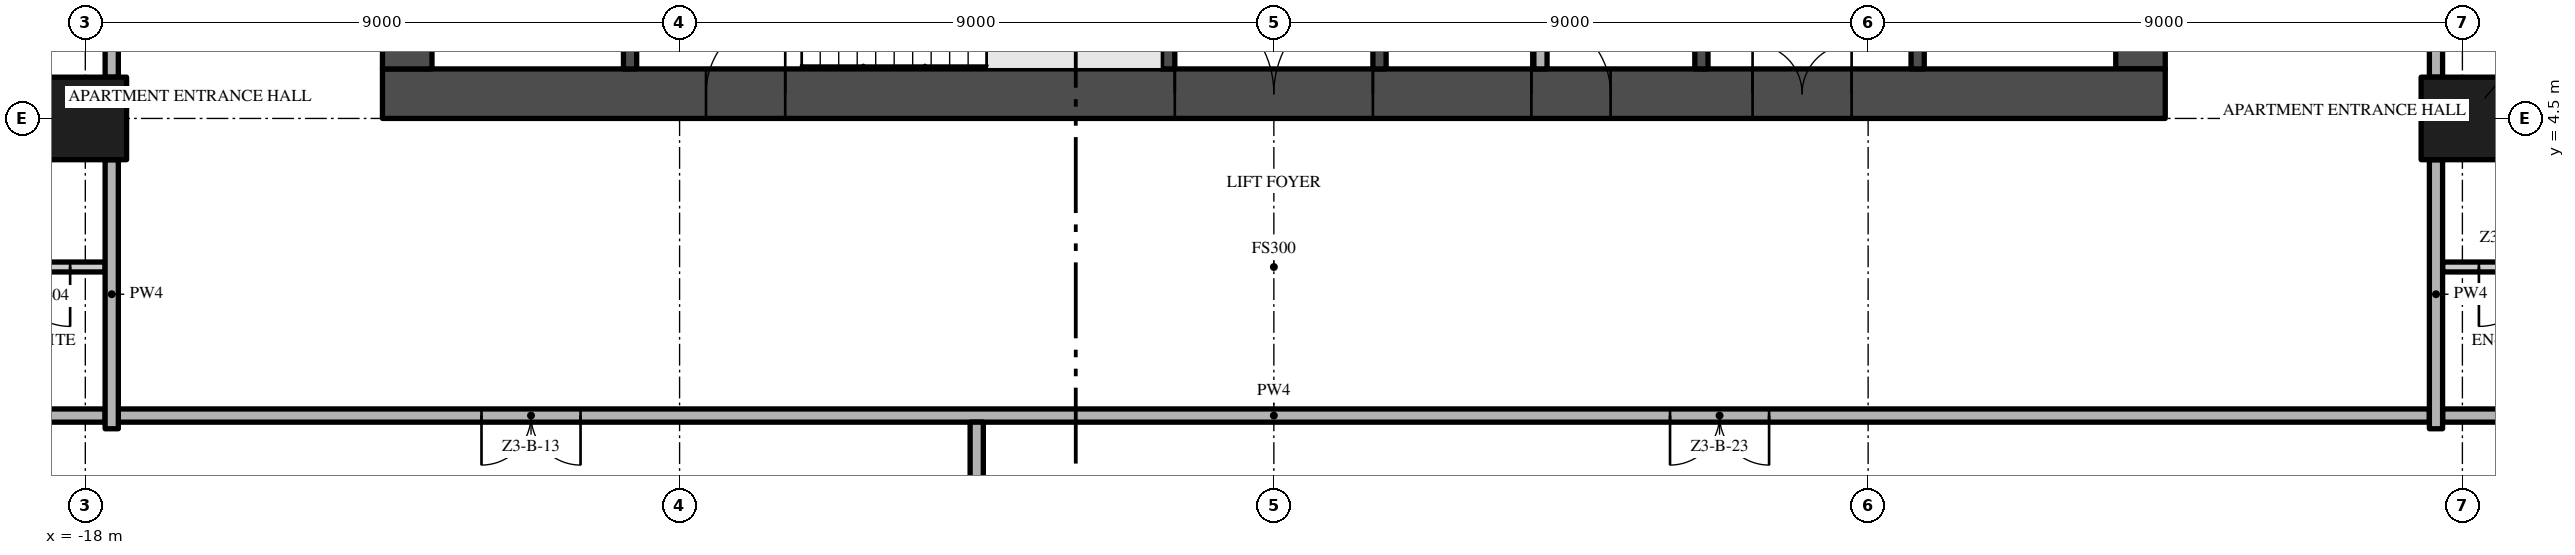
"""IFC4 building model, lengths in metres.
Left out: names, types, materials, properties, quantities, classifications, styles, units other than length and angle.
Written with IfcOpenShell. Run it as: python <this file> out.ifc"""

import sys

from ifc_helpers import new_model, si_unit, direction, frame, frame_2d, origin, origin_2d, place, context, subcontext, project, spatial, rectangle, extrude, element, fill, save


model = new_model("IFC4")
c1 = context("Model", 3, precision=1e-05, world=origin(), true_north=direction((0.0, 1.0)))
c2 = subcontext(c1, "Body", "Model", "MODEL_VIEW")
j1 = project(units=[si_unit("LENGTHUNIT", "METRE"), si_unit("PLANEANGLEUNIT", "RADIAN")], contexts=[c1])
p1 = place(None, origin())
s1 = spatial("IfcSite", under=j1, at=p1, CompositionType="ELEMENT")
p2 = place(p1, origin())
s2 = spatial("IfcBuilding", under=s1, at=p2, CompositionType="ELEMENT")
p3 = place(p2, frame((0.0, 0.0, 140.2)))
s3 = spatial("IfcBuildingStorey", under=s2, at=p3, CompositionType="ELEMENT", Elevation=140.2)
p4 = place(p3, frame((-13.5, 4.875, -0.3), z_axis=(0.0, 0.0, 1.0), x_axis=(1.0, 0.0, 0.0)))
e1 = element("IfcWall", 1, at=p4, inside=s3, PredefinedType="SHEAR", context=c2, shape_type="SweptSolid", body=[
    extrude(rectangle(XDim=27.0, YDim=0.75, at=frame_2d((13.5, 0.0))), origin(), (0.0, 0.0, 1.0), 3.8),
])
p5 = place(p4, frame((12.0, 0.0, 0.3)))
e2 = element("IfcOpeningElement", 2, at=p5, cuts=e1, PredefinedType="OPENING", context=c2, shape_type="SweptSolid", body=[
    extrude(rectangle(XDim=3.0, YDim=2.4, at=frame_2d((1.5, 1.2))), frame((0.0, 0.385, 0.0), z_axis=(0.0, -1.0, 0.0), x_axis=(1.0, 0.0, 0.0)), (0.0, 0.0, 1.0), 0.77),
])
p6 = place(p4, frame((4.9, 0.0, 0.3)))
e3 = element("IfcOpeningElement", 3, at=p6, cuts=e1, PredefinedType="OPENING", context=c2, shape_type="SweptSolid", body=[
    extrude(rectangle(XDim=1.2, YDim=2.2, at=frame_2d((0.6, 1.1))), frame((0.0, 0.385, 0.0), z_axis=(0.0, -1.0, 0.0), x_axis=(1.0, 0.0, 0.0)), (0.0, 0.0, 1.0), 0.77),
])
p7 = place(p4, frame((20.75, 0.0, 0.3)))
e4 = element("IfcOpeningElement", 4, at=p7, cuts=e1, PredefinedType="OPENING", context=c2, shape_type="SweptSolid", body=[
    extrude(rectangle(XDim=1.5, YDim=2.2, at=frame_2d((0.75, 1.1))), frame((0.0, 0.385, 0.0), z_axis=(0.0, -1.0, 0.0), x_axis=(1.0, 0.0, 0.0)), (0.0, 0.0, 1.0), 0.77),
])
p8 = place(p4, frame((17.4, 0.0, 0.3)))
e5 = element("IfcOpeningElement", 5, at=p8, cuts=e1, PredefinedType="OPENING", context=c2, shape_type="SweptSolid", body=[
    extrude(rectangle(XDim=1.2, YDim=2.2, at=frame_2d((0.6, 1.1))), frame((0.0, 0.385, 0.0), z_axis=(0.0, -1.0, 0.0), x_axis=(1.0, 0.0, 0.0)), (0.0, 0.0, 1.0), 0.77),
])
p9 = place(p3, frame((13.125, 5.25, -0.3), z_axis=(0.0, 0.0, 1.0), x_axis=(0.0, 1.0, 0.0)))
e6 = element("IfcWall", 6, at=p9, inside=s3, PredefinedType="SHEAR", context=c2, shape_type="SweptSolid", body=[
    extrude(rectangle(XDim=16.5, YDim=0.75, at=frame_2d((8.25, 0.0))), origin(), (0.0, 0.0, 1.0), 3.8),
])
p10 = place(p9, frame((6.15, 0.0, 0.3)))
e7 = element("IfcOpeningElement", 7, at=p10, cuts=e6, PredefinedType="OPENING", context=c2, shape_type="SweptSolid", body=[
    extrude(rectangle(XDim=1.2, YDim=2.2, at=frame_2d((0.6, 1.1))), frame((0.0, 0.385, 0.0), z_axis=(0.0, -1.0, 0.0), x_axis=(1.0, 0.0, 0.0)), (0.0, 0.0, 1.0), 0.77),
])
p11 = place(p3, frame((-13.125, 21.75, -0.3), z_axis=(0.0, 0.0, 1.0), x_axis=(0.0, -1.0, 0.0)))
e8 = element("IfcWall", 8, at=p11, inside=s3, PredefinedType="SHEAR", context=c2, shape_type="SweptSolid", body=[
    extrude(rectangle(XDim=16.5, YDim=0.75, at=frame_2d((8.25, 0.0))), origin(), (0.0, 0.0, 1.0), 3.8),
])
p12 = place(p11, frame((9.15, 0.0, 0.3)))
e9 = element("IfcOpeningElement", 9, at=p12, cuts=e8, PredefinedType="OPENING", context=c2, shape_type="SweptSolid", body=[
    extrude(rectangle(XDim=1.2, YDim=2.2, at=frame_2d((0.6, 1.1))), frame((0.0, 0.385, 0.0), z_axis=(0.0, -1.0, 0.0), x_axis=(1.0, 0.0, 0.0)), (0.0, 0.0, 1.0), 0.77),
])
for number, where, z_axis, x_axis in (
    (10, (-18.0, 4.5, 0.0), (0.0, 0.0, 1.0), (1.0, 0.0, 0.0)),
    (11, (18.0, 4.5, 0.0), (0.0, 0.0, 1.0), (1.0, 0.0, 0.0)),
):
    element("IfcColumn", number, at=place(p3, frame(where, z_axis=z_axis, x_axis=x_axis)), inside=s3, PredefinedType="COLUMN", context=c2, shape_type="SweptSolid", body=[
        extrude(rectangle(XDim=1.25, YDim=1.25, at=origin_2d()), origin(), (0.0, 0.0, 1.0), 3.5),
    ])
for number, where, z_axis, x_axis in (
    (12, (-9.75, 5.25, 0.0), (0.0, 0.0, 1.0), (0.0, 1.0, 0.0)),
    (13, (-1.6, 5.25, 0.0), (0.0, 0.0, 1.0), (0.0, 1.0, 0.0)),
):
    element("IfcWall", number, at=place(p3, frame(where, z_axis=z_axis, x_axis=x_axis)), inside=s3, PredefinedType="SHEAR", context=c2, shape_type="SweptSolid", body=[
        extrude(rectangle(XDim=2.7, YDim=0.2, at=frame_2d((1.35, 0.0))), origin(), (0.0, 0.0, 1.0), 3.5),
    ])
p13 = place(p3, frame((1.6, 9.8, 0.0), z_axis=(0.0, 0.0, 1.0), x_axis=(0.0, -1.0, 0.0)))
e14 = element("IfcWall", 14, at=p13, inside=s3, PredefinedType="SHEAR", context=c2, shape_type="SweptSolid", body=[
    extrude(rectangle(XDim=4.55, YDim=0.2, at=frame_2d((2.275, 0.0))), origin(), (0.0, 0.0, 1.0), 3.5),
])
p14 = place(p13, frame((1.425, 0.0, 0.0)))
e15 = element("IfcOpeningElement", 15, at=p14, cuts=e14, PredefinedType="OPENING", context=c2, shape_type="SweptSolid", body=[
    extrude(rectangle(XDim=0.9, YDim=2.1, at=frame_2d((0.45, 1.05))), frame((0.0, 0.11, 0.0), z_axis=(0.0, -1.0, 0.0), x_axis=(1.0, 0.0, 0.0)), (0.0, 0.0, 1.0), 0.22),
])
p15 = place(p3, frame((4.037, 9.8, 0.0), z_axis=(0.0, 0.0, 1.0), x_axis=(0.0, -1.0, 0.0)))
e16 = element("IfcWall", 16, at=p15, inside=s3, PredefinedType="PARTITIONING", context=c2, shape_type="SweptSolid", body=[
    extrude(rectangle(XDim=4.55, YDim=0.2, at=frame_2d((2.275, 0.0))), origin(), (0.0, 0.0, 1.0), 3.5),
])
p16 = place(p15, frame((1.825, 0.0, 0.0)))
e17 = element("IfcOpeningElement", 17, at=p16, cuts=e16, PredefinedType="OPENING", context=c2, shape_type="SweptSolid", body=[
    extrude(rectangle(XDim=0.9, YDim=2.1, at=frame_2d((0.45, 1.05))), frame((0.0, 0.11, 0.0), z_axis=(0.0, -1.0, 0.0), x_axis=(1.0, 0.0, 0.0)), (0.0, 0.0, 1.0), 0.22),
])
p17 = place(p3, frame((6.475, 5.25, 0.0), z_axis=(0.0, 0.0, 1.0), x_axis=(0.0, 1.0, 0.0)))
e18 = element("IfcWall", 18, at=p17, inside=s3, PredefinedType="SHEAR", context=c2, shape_type="SweptSolid", body=[
    extrude(rectangle(XDim=4.55, YDim=0.2, at=frame_2d((2.275, 0.0))), origin(), (0.0, 0.0, 1.0), 3.5),
])
p18 = place(p3, frame((9.75, 5.25, 0.0), z_axis=(0.0, 0.0, 1.0), x_axis=(0.0, 1.0, 0.0)))
e19 = element("IfcWall", 19, at=p18, inside=s3, PredefinedType="SHEAR", context=c2, shape_type="SweptSolid", body=[
    extrude(rectangle(XDim=2.35, YDim=0.2, at=frame_2d((1.175, 0.0))), origin(), (0.0, 0.0, 1.0), 3.5),
])
p19 = place(p18, frame((0.7, 0.0, 0.0)))
e20 = element("IfcOpeningElement", 20, at=p19, cuts=e19, PredefinedType="OPENING", context=c2, shape_type="SweptSolid", body=[
    extrude(rectangle(XDim=1.1, YDim=2.1, at=frame_2d((0.55, 1.05))), frame((0.0, 0.11, 0.0), z_axis=(0.0, -1.0, 0.0), x_axis=(1.0, 0.0, 0.0)), (0.0, 0.0, 1.0), 0.22),
])
p20 = place(p3, frame((17.5, 0.0, 0.0), z_axis=(0.0, 0.0, 1.0), x_axis=(-1.0, 0.0, 0.0)))
e21 = element("IfcWall", 21, at=p20, inside=s3, PredefinedType="PARTITIONING", context=c2, shape_type="SweptSolid", body=[
    extrude(rectangle(XDim=35.0, YDim=0.2, at=frame_2d((17.5, 0.0))), origin(), (0.0, 0.0, 1.0), 3.5),
])
p21 = place(p20, frame((28.0, 0.0, 0.0)))
e22 = element("IfcOpeningElement", 22, at=p21, cuts=e21, PredefinedType="OPENING", context=c2, shape_type="SweptSolid", body=[
    extrude(rectangle(XDim=1.5, YDim=2.4, at=frame_2d((0.75, 1.2))), frame((0.0, 0.11, 0.0), z_axis=(0.0, -1.0, 0.0), x_axis=(1.0, 0.0, 0.0)), (0.0, 0.0, 1.0), 0.22),
])
p22 = place(p20, frame((10.0, 0.0, 0.0)))
e23 = element("IfcOpeningElement", 23, at=p22, cuts=e21, PredefinedType="OPENING", context=c2, shape_type="SweptSolid", body=[
    extrude(rectangle(XDim=1.5, YDim=2.4, at=frame_2d((0.75, 1.2))), frame((0.0, 0.11, 0.0), z_axis=(0.0, -1.0, 0.0), x_axis=(1.0, 0.0, 0.0)), (0.0, 0.0, 1.0), 0.22),
])
for number, where, z_axis, x_axis in (
    (24, (-22.2, 0.0, 0.0), (0.0, 0.0, 1.0), (1.0, 0.0, 0.0)),
    (25, (17.7, 0.0, 0.0), (0.0, 0.0, 1.0), (1.0, 0.0, 0.0)),
):
    element("IfcWall", number, at=place(p3, frame(where, z_axis=z_axis, x_axis=x_axis)), inside=s3, PredefinedType="PARTITIONING", context=c2, shape_type="SweptSolid", body=[
        extrude(rectangle(XDim=4.5, YDim=0.2, at=frame_2d((2.25, 0.0))), origin(), (0.0, 0.0, 1.0), 3.5),
    ])
p23 = place(p3, frame((-17.7, 2.25, 0.0), z_axis=(0.0, 0.0, 1.0), x_axis=(-1.0, 0.0, 0.0)))
e26 = element("IfcWall", 26, at=p23, inside=s3, PredefinedType="PARTITIONING", context=c2, shape_type="SweptSolid", body=[
    extrude(rectangle(XDim=2.03, YDim=0.15, at=frame_2d((1.015, 0.0))), origin(), (0.0, 0.0, 1.0), 3.5),
])
p24 = place(p23, frame((0.53, 0.0, 0.0)))
e27 = element("IfcOpeningElement", 27, at=p24, cuts=e26, PredefinedType="OPENING", context=c2, shape_type="SweptSolid", body=[
    extrude(rectangle(XDim=0.9, YDim=2.1, at=frame_2d((0.45, 1.05))), frame((0.0, 0.085, 0.0), z_axis=(0.0, -1.0, 0.0), x_axis=(1.0, 0.0, 0.0)), (0.0, 0.0, 1.0), 0.17),
])
p25 = place(p3, frame((19.73, 2.25, 0.0), z_axis=(0.0, 0.0, 1.0), x_axis=(-1.0, 0.0, 0.0)))
e28 = element("IfcWall", 28, at=p25, inside=s3, PredefinedType="PARTITIONING", context=c2, shape_type="SweptSolid", body=[
    extrude(rectangle(XDim=2.03, YDim=0.15, at=frame_2d((1.015, 0.0))), origin(), (0.0, 0.0, 1.0), 3.5),
])
p26 = place(p25, frame((0.58, 0.0, 0.0)))
e29 = element("IfcOpeningElement", 29, at=p26, cuts=e28, PredefinedType="OPENING", context=c2, shape_type="SweptSolid", body=[
    extrude(rectangle(XDim=0.9, YDim=2.1, at=frame_2d((0.45, 1.05))), frame((0.0, 0.085, 0.0), z_axis=(0.0, -1.0, 0.0), x_axis=(1.0, 0.0, 0.0)), (0.0, 0.0, 1.0), 0.17),
])
p27 = place(p3, frame((-17.6, -0.2, 0.0), z_axis=(0.0, 0.0, 1.0), x_axis=(0.0, 1.0, 0.0)))
e30 = element("IfcWall", 30, at=p27, inside=s3, PredefinedType="PARTITIONING", context=c2, shape_type="SweptSolid", body=[
    extrude(rectangle(XDim=4.075, YDim=0.2, at=frame_2d((2.038, 0.0))), origin(), (0.0, 0.0, 1.0), 3.5),
])
p28 = place(p3, frame((-17.6, 5.125, 0.0), z_axis=(0.0, 0.0, 1.0), x_axis=(0.0, 1.0, 0.0)))
e31 = element("IfcWall", 31, at=p28, inside=s3, PredefinedType="PARTITIONING", context=c2, shape_type="SweptSolid", body=[
    extrude(rectangle(XDim=7.75, YDim=0.2, at=frame_2d((3.875, 0.0))), origin(), (0.0, 0.0, 1.0), 3.5),
])
p29 = place(p28, frame((1.0, 0.0, 0.0)))
e32 = element("IfcOpeningElement", 32, at=p29, cuts=e31, PredefinedType="OPENING", context=c2, shape_type="SweptSolid", body=[
    extrude(rectangle(XDim=1.2, YDim=2.4, at=frame_2d((0.6, 1.2))), frame((0.0, 0.11, 0.0), z_axis=(0.0, -1.0, 0.0), x_axis=(1.0, 0.0, 0.0)), (0.0, 0.0, 1.0), 0.22),
])
p30 = place(p3, frame((-4.5, -17.7, 0.0), z_axis=(0.0, 0.0, 1.0), x_axis=(0.0, 1.0, 0.0)))
e33 = element("IfcWall", 33, at=p30, inside=s3, PredefinedType="PARTITIONING", context=c2, shape_type="SweptSolid", body=[
    extrude(rectangle(XDim=17.6, YDim=0.2, at=frame_2d((8.8, 0.0))), origin(), (0.0, 0.0, 1.0), 3.5),
])
p31 = place(p3, frame((17.6, -0.2, 0.0), z_axis=(0.0, 0.0, 1.0), x_axis=(0.0, 1.0, 0.0)))
e34 = element("IfcWall", 34, at=p31, inside=s3, PredefinedType="PARTITIONING", context=c2, shape_type="SweptSolid", body=[
    extrude(rectangle(XDim=4.075, YDim=0.2, at=frame_2d((2.038, 0.0))), origin(), (0.0, 0.0, 1.0), 3.5),
])
p32 = place(p3, frame((17.6, 12.875, 0.0), z_axis=(0.0, 0.0, 1.0), x_axis=(0.0, -1.0, 0.0)))
e35 = element("IfcWall", 35, at=p32, inside=s3, PredefinedType="PARTITIONING", context=c2, shape_type="SweptSolid", body=[
    extrude(rectangle(XDim=7.75, YDim=0.2, at=frame_2d((3.875, 0.0))), origin(), (0.0, 0.0, 1.0), 3.5),
])
p33 = place(p32, frame((5.55, 0.0, 0.0)))
e36 = element("IfcOpeningElement", 36, at=p33, cuts=e35, PredefinedType="OPENING", context=c2, shape_type="SweptSolid", body=[
    extrude(rectangle(XDim=1.2, YDim=2.4, at=frame_2d((0.6, 1.2))), frame((0.0, 0.11, 0.0), z_axis=(0.0, -1.0, 0.0), x_axis=(1.0, 0.0, 0.0)), (0.0, 0.0, 1.0), 0.22),
])
p34 = place(p5, frame((3.0, 0.0, 0.0), z_axis=(0.0, 0.0, 1.0), x_axis=(-1.0, 0.0, 0.0)))
e37 = element("IfcDoor", 37, at=p34, inside=s3, OperationType="DOUBLE_DOOR_SINGLE_SWING", PredefinedType="DOOR", context=c2, shape_type="SweptSolid", body=[
    extrude(rectangle(XDim=3.0, YDim=2.4, at=frame_2d((1.5, 1.2))), frame((0.0, 0.025, 0.0), z_axis=(0.0, -1.0, 0.0), x_axis=(1.0, 0.0, 0.0)), (0.0, 0.0, 1.0), 0.05),
])
fill(e2, e37)
p35 = place(p6, frame((1.2, 0.0, 0.0), z_axis=(0.0, 0.0, 1.0), x_axis=(-1.0, 0.0, 0.0)))
e38 = element("IfcDoor", 38, at=p35, inside=s3, OperationType="SINGLE_SWING_LEFT", PredefinedType="DOOR", context=c2, shape_type="SweptSolid", body=[
    extrude(rectangle(XDim=1.2, YDim=2.2, at=frame_2d((0.6, 1.1))), frame((0.0, 0.025, 0.0), z_axis=(0.0, -1.0, 0.0), x_axis=(1.0, 0.0, 0.0)), (0.0, 0.0, 1.0), 0.05),
])
fill(e3, e38)
p36 = place(p7, frame((1.5, 0.0, 0.0), z_axis=(0.0, 0.0, 1.0), x_axis=(-1.0, 0.0, 0.0)))
e39 = element("IfcDoor", 39, at=p36, inside=s3, OperationType="DOUBLE_DOOR_SINGLE_SWING", PredefinedType="DOOR", context=c2, shape_type="SweptSolid", body=[
    extrude(rectangle(XDim=1.5, YDim=2.2, at=frame_2d((0.75, 1.1))), frame((0.0, 0.025, 0.0), z_axis=(0.0, -1.0, 0.0), x_axis=(1.0, 0.0, 0.0)), (0.0, 0.0, 1.0), 0.05),
])
fill(e4, e39)
p37 = place(p8, frame((1.2, 0.0, 0.0), z_axis=(0.0, 0.0, 1.0), x_axis=(-1.0, 0.0, 0.0)))
e40 = element("IfcDoor", 40, at=p37, inside=s3, OperationType="SINGLE_SWING_RIGHT", PredefinedType="DOOR", context=c2, shape_type="SweptSolid", body=[
    extrude(rectangle(XDim=1.2, YDim=2.2, at=frame_2d((0.6, 1.1))), frame((0.0, 0.025, 0.0), z_axis=(0.0, -1.0, 0.0), x_axis=(1.0, 0.0, 0.0)), (0.0, 0.0, 1.0), 0.05),
])
fill(e5, e40)
p38 = place(p24, origin())
e41 = element("IfcDoor", 41, at=p38, inside=s3, OperationType="SINGLE_SWING_LEFT", PredefinedType="DOOR", context=c2, shape_type="SweptSolid", body=[
    extrude(rectangle(XDim=0.9, YDim=2.1, at=frame_2d((0.45, 1.05))), frame((0.0, 0.025, 0.0), z_axis=(0.0, -1.0, 0.0), x_axis=(1.0, 0.0, 0.0)), (0.0, 0.0, 1.0), 0.05),
])
fill(e27, e41)
p39 = place(p26, origin())
e42 = element("IfcDoor", 42, at=p39, inside=s3, OperationType="SINGLE_SWING_RIGHT", PredefinedType="DOOR", context=c2, shape_type="SweptSolid", body=[
    extrude(rectangle(XDim=0.9, YDim=2.1, at=frame_2d((0.45, 1.05))), frame((0.0, 0.025, 0.0), z_axis=(0.0, -1.0, 0.0), x_axis=(1.0, 0.0, 0.0)), (0.0, 0.0, 1.0), 0.05),
])
fill(e29, e42)
p40 = place(p21, origin())
e43 = element("IfcDoor", 43, at=p40, inside=s3, OperationType="DOUBLE_DOOR_SINGLE_SWING", PredefinedType="DOOR", context=c2, shape_type="SweptSolid", body=[
    extrude(rectangle(XDim=1.5, YDim=2.4, at=frame_2d((0.75, 1.2))), frame((0.0, 0.025, 0.0), z_axis=(0.0, -1.0, 0.0), x_axis=(1.0, 0.0, 0.0)), (0.0, 0.0, 1.0), 0.05),
])
fill(e22, e43)
p41 = place(p22, origin())
e44 = element("IfcDoor", 44, at=p41, inside=s3, OperationType="DOUBLE_DOOR_SINGLE_SWING", PredefinedType="DOOR", context=c2, shape_type="SweptSolid", body=[
    extrude(rectangle(XDim=1.5, YDim=2.4, at=frame_2d((0.75, 1.2))), frame((0.0, 0.025, 0.0), z_axis=(0.0, -1.0, 0.0), x_axis=(1.0, 0.0, 0.0)), (0.0, 0.0, 1.0), 0.05),
])
fill(e23, e44)
save(model, sys.argv[1])
